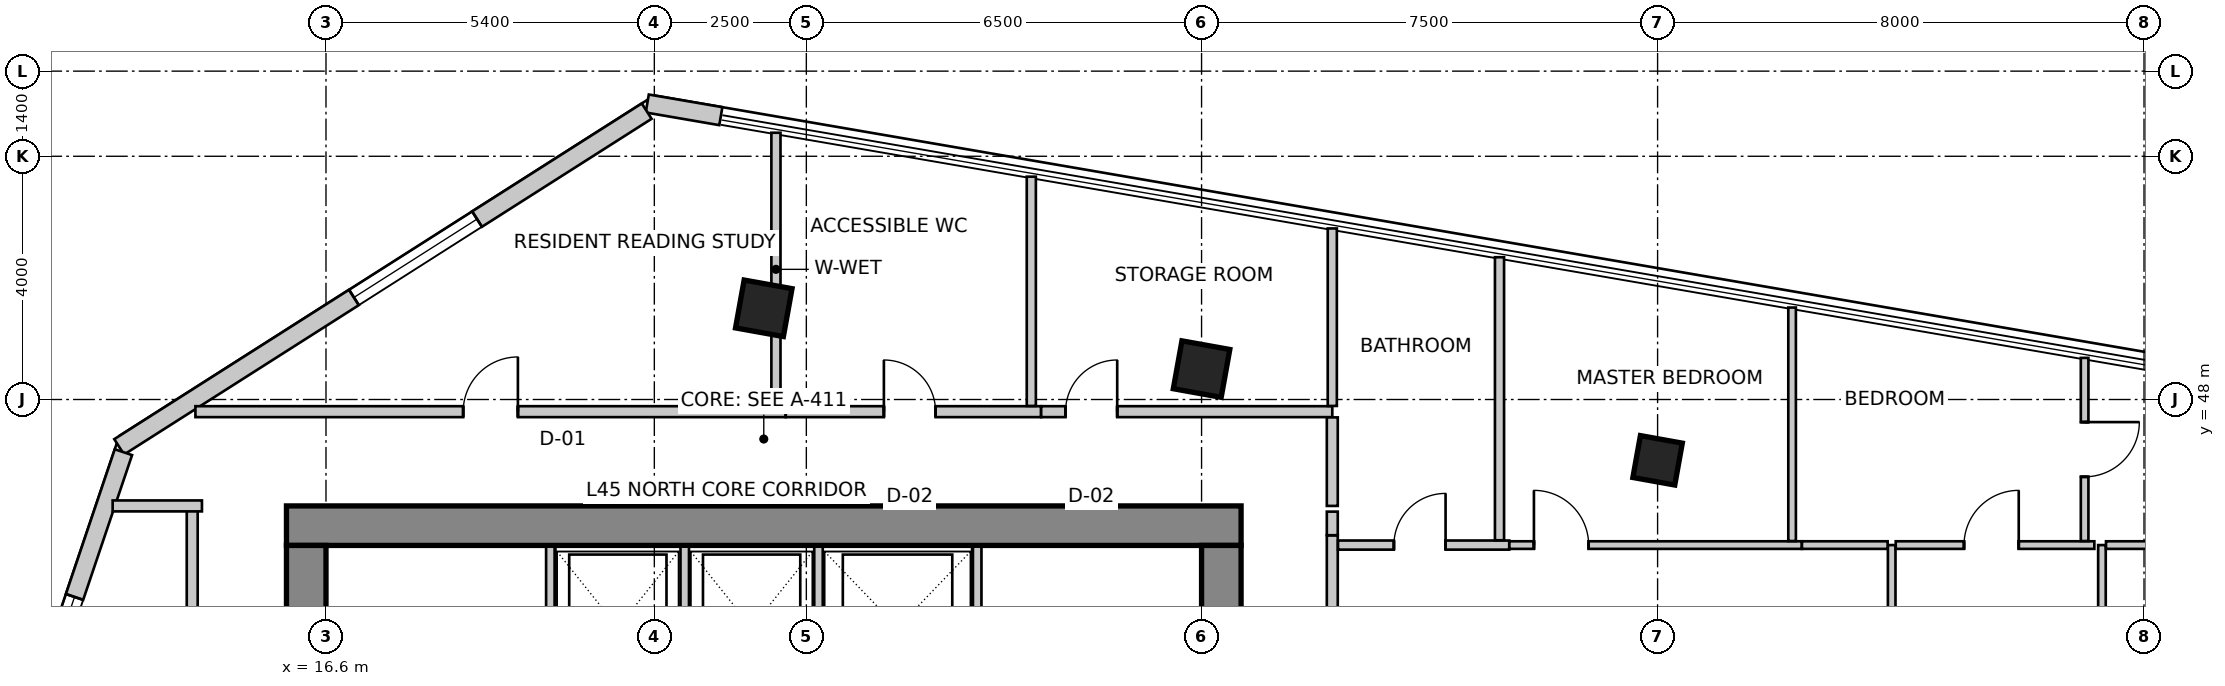
"""IFC4 building model, lengths in metres.
Left out: names, types, materials, properties, quantities, classifications, styles, units other than length and angle.
Written with IfcOpenShell. Run it as: python <this file> out.ifc"""

import sys

from ifc_helpers import new_model, si_unit, direction, frame, frame_2d, origin, origin_2d, place, context, subcontext, project, spatial, rectangle, extrude, source, transform, mapped, element, fill, save


model = new_model("IFC4")
c1 = context("Model", 3, precision=1e-05, world=origin(), true_north=direction((0.0, 1.0)))
c2 = subcontext(c1, "Body", "Model", "MODEL_VIEW")
j1 = project(units=[si_unit("LENGTHUNIT", "METRE"), si_unit("PLANEANGLEUNIT", "RADIAN")], contexts=[c1])
p1 = place(None, origin())
s1 = spatial("IfcSite", under=j1, at=p1, CompositionType="ELEMENT")
p2 = place(p1, origin())
s2 = spatial("IfcBuilding", under=s1, at=p2, CompositionType="ELEMENT")
p3 = place(p2, frame((0.0, 0.0, 183.4)))
s3 = spatial("IfcBuildingStorey", under=s2, at=p3, CompositionType="ELEMENT", Elevation=183.4)
p4 = place(p3, frame((15.95, 45.925, 0.0), z_axis=(0.0, 0.0, 1.0), x_axis=(1.0, 0.0, 0.0)))
e1 = element("IfcWall", 1, at=p4, inside=s3, PredefinedType="SHEAR", context=c2, shape_type="SweptSolid", body=[
    extrude(rectangle(XDim=15.7, YDim=0.65, at=frame_2d((7.85, 0.0))), origin(), (0.0, 0.0, 1.0), 3.5),
])
p5 = place(p3, frame((16.275, 34.2, 0.0), z_axis=(0.0, 0.0, 1.0), x_axis=(0.0, 1.0, 0.0)))
e2 = element("IfcWall", 2, at=p5, inside=s3, PredefinedType="SHEAR", context=c2, shape_type="SweptSolid", body=[
    extrude(rectangle(XDim=11.4, YDim=0.65, at=frame_2d((5.7, 0.0))), origin(), (0.0, 0.0, 1.0), 3.5),
])
m1 = source(origin(), c2, "Body", "SweptSolid", [
    extrude(rectangle(XDim=1.1, YDim=2.15, at=frame_2d((0.55, 1.075))), frame((0.0, 0.335, 0.0), z_axis=(0.0, -1.0, 0.0), x_axis=(1.0, 0.0, 0.0)), (0.0, 0.0, 1.0), 0.67),
])
p6 = place(p5, frame((7.15, 0.0, 0.0)))
e3 = element("IfcOpeningElement", 3, at=p6, cuts=e2, PredefinedType="OPENING", context=c2, shape_type="MappedRepresentation", body=[
    mapped(m1, transform((0.0, 0.0, 0.0), scale=1.0)),
])
p7 = place(p3, frame((31.325, 34.2, 0.0), z_axis=(0.0, 0.0, 1.0), x_axis=(0.0, 1.0, 0.0)))
e4 = element("IfcWall", 4, at=p7, inside=s3, PredefinedType="SHEAR", context=c2, shape_type="SweptSolid", body=[
    extrude(rectangle(XDim=11.4, YDim=0.65, at=frame_2d((5.7, 0.0))), origin(), (0.0, 0.0, 1.0), 3.5),
])
p8 = place(p7, frame((7.35, 0.0, 0.0)))
e5 = element("IfcOpeningElement", 5, at=p8, cuts=e4, PredefinedType="OPENING", context=c2, shape_type="MappedRepresentation", body=[
    mapped(m1, transform((0.0, 0.0, 0.0), scale=1.0)),
])
m2 = source(origin(), c2, "Body", "SweptSolid", [
    extrude(rectangle(XDim=0.8, YDim=0.8, at=origin_2d()), origin(), (0.0, 0.0, 1.0), 3.5),
])
for number, where, z_axis, x_axis in (
    (6, (23.8, 49.5, 0.0), (0.0, 0.0, 1.0), (0.984, -0.177, 0.0)),
    (7, (31.0, 48.5, 0.0), (0.0, 0.0, 1.0), (0.984, -0.177, 0.0)),
):
    element("IfcColumn", number, at=place(p3, frame(where, z_axis=z_axis, x_axis=x_axis)), inside=s3, PredefinedType="COLUMN", context=c2, shape_type="MappedRepresentation", body=[
        mapped(m2, transform((0.0, 0.0, 0.0), scale=1.0)),
    ])
m3 = source(origin(), c2, "Body", "SweptSolid", [
    extrude(rectangle(XDim=0.7, YDim=0.7, at=origin_2d()), origin(), (0.0, 0.0, 1.0), 3.5),
])
p9 = place(p3, frame((38.5, 47.0, 0.0), z_axis=(0.0, 0.0, 1.0), x_axis=(0.984195607969, -0.17708474032, 0.0)))
e8 = element("IfcColumn", 8, at=p9, inside=s3, PredefinedType="COLUMN", context=c2, shape_type="MappedRepresentation", body=[
    mapped(m3, transform((0.0, 0.0, 0.0), scale=1.0)),
])
p10 = place(p3, frame((23.094, 52.66, 0.0), z_axis=(0.0, 0.0, 1.0), x_axis=(-0.985503719785, 0.169653818966, 0.0)))
e9 = element("IfcWall", 9, at=p10, inside=s3, PredefinedType="SOLIDWALL", context=c2, shape_type="SweptSolid", body=[
    extrude(rectangle(XDim=1.228, YDim=0.3, at=frame_2d((0.614, 0.0))), origin(), (0.0, 0.0, 1.0), 3.25),
])
p11 = place(p3, frame((21.875, 52.742, 0.0), z_axis=(0.0, 0.0, 1.0), x_axis=(-0.843666375448, -0.536867811419, 0.0)))
e10 = element("IfcWall", 10, at=p11, inside=s3, PredefinedType="SOLIDWALL", context=c2, shape_type="SweptSolid", body=[
    extrude(rectangle(XDim=10.284, YDim=0.3, at=frame_2d((5.142, 0.0))), origin(), (0.0, 0.0, 1.0), 3.25),
])
m4 = source(origin(), c2, "Body", "SweptSolid", [
    extrude(rectangle(XDim=2.4, YDim=2.2, at=frame_2d((1.2, 1.1))), frame((0.0, 0.16, 0.0), z_axis=(0.0, -1.0, 0.0), x_axis=(1.0, 0.0, 0.0)), (0.0, 0.0, 1.0), 0.32),
])
p12 = place(p11, frame((3.307, 0.0, 0.85)))
e11 = element("IfcOpeningElement", 11, at=p12, cuts=e10, PredefinedType="OPENING", context=c2, shape_type="MappedRepresentation", body=[
    mapped(m4, transform((0.0, 0.0, 0.0), scale=1.0)),
])
p13 = place(p3, frame((13.269, 47.134, 0.0), z_axis=(0.0, 0.0, 1.0), x_axis=(-0.319920776449, -0.947444297464, 0.0)))
e12 = element("IfcWall", 12, at=p13, inside=s3, PredefinedType="SOLIDWALL", context=c2, shape_type="SweptSolid", body=[
    extrude(rectangle(XDim=16.133, YDim=0.3, at=frame_2d((8.067, 0.0))), origin(), (0.0, 0.0, 1.0), 3.25),
])
m5 = source(origin(), c2, "Body", "SweptSolid", [
    extrude(rectangle(XDim=2.1, YDim=2.0, at=frame_2d((1.05, 1.0))), frame((0.0, 0.16, 0.0), z_axis=(0.0, -1.0, 0.0), x_axis=(1.0, 0.0, 0.0)), (0.0, 0.0, 1.0), 0.32),
])
p14 = place(p13, frame((2.513, 0.0, 0.85)))
e13 = element("IfcOpeningElement", 13, at=p14, cuts=e12, PredefinedType="OPENING", context=c2, shape_type="MappedRepresentation", body=[
    mapped(m5, transform((0.0, 0.0, 0.0), scale=1.0)),
])
p15 = place(p13, frame((7.26, 0.0, 0.85)))
e14 = element("IfcOpeningElement", 14, at=p15, cuts=e12, PredefinedType="OPENING", context=c2, shape_type="MappedRepresentation", body=[
    mapped(m4, transform((0.0, 0.0, 0.0), scale=1.0)),
])
p16 = place(p13, frame((12.307, 0.0, 0.85)))
e15 = element("IfcOpeningElement", 15, at=p16, cuts=e12, PredefinedType="OPENING", context=c2, shape_type="MappedRepresentation", body=[
    mapped(m5, transform((0.0, 0.0, 0.0), scale=1.0)),
])
for number, where, z_axis, x_axis in (
    (16, (20.29, 43.28, 0.0), (0.0, 0.0, 1.0), (0.0, 1.0, 0.0)),
    (17, (27.31, 43.28, 0.0), (0.0, 0.0, 1.0), (0.0, 1.0, 0.0)),
):
    element("IfcWall", number, at=place(p3, frame(where, z_axis=z_axis, x_axis=x_axis)), inside=s3, PredefinedType="SOLIDWALL", context=c2, shape_type="SweptSolid", body=[
        extrude(rectangle(XDim=2.3, YDim=0.14, at=frame_2d((1.15, 0.0))), origin(), (0.0, 0.0, 1.0), 3.25),
    ])
for number, where, z_axis, x_axis in (
    (18, (22.5, 43.02, 0.0), (0.0, 0.0, 1.0), (0.0, 1.0, 0.0)),
    (19, (24.7, 43.02, 0.0), (0.0, 0.0, 1.0), (0.0, 1.0, 0.0)),
):
    element("IfcWall", number, at=place(p3, frame(where, z_axis=z_axis, x_axis=x_axis)), inside=s3, PredefinedType="SOLIDWALL", context=c2, shape_type="SweptSolid", body=[
        extrude(rectangle(XDim=2.56, YDim=0.14, at=frame_2d((1.28, 0.0))), origin(), (0.0, 0.0, 1.0), 3.25),
    ])
p17 = place(p3, frame((14.4, 33.644, 0.0), z_axis=(0.0, 0.0, 1.0), x_axis=(0.0, 1.0, 0.0)))
e20 = element("IfcWall", 20, at=p17, inside=s3, PredefinedType="PARTITIONING", context=c2, shape_type="SweptSolid", body=[
    extrude(rectangle(XDim=12.606, YDim=0.18, at=frame_2d((6.303, 0.0))), origin(), (0.0, 0.0, 1.0), 3.25),
])
m6 = source(origin(), c2, "Body", "SweptSolid", [
    extrude(rectangle(XDim=0.9, YDim=2.15, at=frame_2d((0.45, 1.075))), frame((0.0, 0.1, 0.0), z_axis=(0.0, -1.0, 0.0), x_axis=(1.0, 0.0, 0.0)), (0.0, 0.0, 1.0), 0.2),
])
p18 = place(p17, frame((4.399, 0.0, 0.0)))
e21 = element("IfcOpeningElement", 21, at=p18, cuts=e20, PredefinedType="OPENING", context=c2, shape_type="MappedRepresentation", body=[
    mapped(m6, transform((0.0, 0.0, 0.0), scale=1.0)),
])
p19 = place(p3, frame((14.56, 46.25, 0.0), z_axis=(0.0, 0.0, 1.0), x_axis=(-1.0, 0.0, 0.0)))
e22 = element("IfcWall", 22, at=p19, inside=s3, PredefinedType="PARTITIONING", context=c2, shape_type="SweptSolid", body=[
    extrude(rectangle(XDim=1.469, YDim=0.18, at=frame_2d((0.734, 0.0))), origin(), (0.0, 0.0, 1.0), 3.25),
])
p20 = place(p3, frame((14.453, 47.8, 0.0), z_axis=(0.0, 0.0, 1.0), x_axis=(1.0, 0.0, 0.0)))
e23 = element("IfcWall", 23, at=p20, inside=s3, PredefinedType="PARTITIONING", context=c2, shape_type="SweptSolid", body=[
    extrude(rectangle(XDim=9.707, YDim=0.18, at=frame_2d((4.854, 0.0))), origin(), (0.0, 0.0, 1.0), 2.835),
])
p21 = place(p20, frame((4.404, 0.0, 0.0)))
e24 = element("IfcOpeningElement", 24, at=p21, cuts=e23, PredefinedType="OPENING", context=c2, shape_type="MappedRepresentation", body=[
    mapped(m6, transform((0.0, 0.0, 0.0), scale=1.0)),
])
p22 = place(p3, frame((24.162, 47.8, 0.0), z_axis=(0.0, 0.0, 1.0), x_axis=(1.0, 0.0, 0.0)))
e25 = element("IfcWall", 25, at=p22, inside=s3, PredefinedType="PARTITIONING", context=c2, shape_type="SweptSolid", body=[
    extrude(rectangle(XDim=4.198, YDim=0.18, at=frame_2d((2.099, 0.0))), origin(), (0.0, 0.0, 1.0), 3.25),
])
m7 = source(origin(), c2, "Body", "SweptSolid", [
    extrude(rectangle(XDim=0.85, YDim=2.15, at=frame_2d((0.425, 1.075))), frame((0.0, 0.1, 0.0), z_axis=(0.0, -1.0, 0.0), x_axis=(1.0, 0.0, 0.0)), (0.0, 0.0, 1.0), 0.2),
])
p23 = place(p22, frame((1.613, 0.0, 0.0)))
e26 = element("IfcOpeningElement", 26, at=p23, cuts=e25, PredefinedType="OPENING", context=c2, shape_type="MappedRepresentation", body=[
    mapped(m7, transform((0.0, 0.0, 0.0), scale=1.0)),
])
p24 = place(p3, frame((28.362, 47.8, 0.0), z_axis=(0.0, 0.0, 1.0), x_axis=(1.0, 0.0, 0.0)))
e27 = element("IfcWall", 27, at=p24, inside=s3, PredefinedType="PARTITIONING", context=c2, shape_type="SweptSolid", body=[
    extrude(rectangle(XDim=4.788, YDim=0.18, at=frame_2d((2.394, 0.0))), origin(), (0.0, 0.0, 1.0), 2.688),
])
p25 = place(p24, frame((0.401, 0.0, 0.0)))
e28 = element("IfcOpeningElement", 28, at=p25, cuts=e27, PredefinedType="OPENING", context=c2, shape_type="MappedRepresentation", body=[
    mapped(m7, transform((0.0, 0.0, 0.0), scale=1.0)),
])
p26 = place(p3, frame((33.15, 47.706, 0.0), z_axis=(0.0, 0.0, 1.0), x_axis=(0.0, -1.0, 0.0)))
e29 = element("IfcWall", 29, at=p26, inside=s3, PredefinedType="PARTITIONING", context=c2, shape_type="SweptSolid", body=[
    extrude(rectangle(XDim=1.456, YDim=0.18, at=frame_2d((0.728, 0.0))), origin(), (0.0, 0.0, 1.0), 2.688),
])
p27 = place(p3, frame((33.15, 45.766, 0.0), z_axis=(0.0, 0.0, 1.0), x_axis=(0.0, -1.0, 0.0)))
e30 = element("IfcWall", 30, at=p27, inside=s3, PredefinedType="PARTITIONING", context=c2, shape_type="SweptSolid", body=[
    extrude(rectangle(XDim=5.526, YDim=0.18, at=frame_2d((2.763, 0.0))), origin(), (0.0, 0.0, 1.0), 2.688),
])
p28 = place(p3, frame((33.15, 46.156, 0.0), z_axis=(0.0, 0.0, 1.0), x_axis=(0.0, -1.0, 0.0)))
e31 = element("IfcWall", 31, at=p28, inside=s3, PredefinedType="PARTITIONING", context=c2, shape_type="SweptSolid", body=[
    extrude(rectangle(XDim=0.388, YDim=0.18, at=frame_2d((0.194, 0.0))), origin(), (0.0, 0.0, 1.0), 3.25),
])
p29 = place(p3, frame((24.0, 52.387, 0.0), z_axis=(0.0, 0.0, 1.0), x_axis=(0.0, -1.0, 0.0)))
e32 = element("IfcWall", 32, at=p29, inside=s3, PredefinedType="PARTITIONING", context=c2, shape_type="SweptSolid", body=[
    extrude(rectangle(XDim=4.493, YDim=0.15, at=frame_2d((2.247, 0.0))), origin(), (0.0, 0.0, 1.0), 2.542),
])
p30 = place(p3, frame((28.2, 51.665, 0.0), z_axis=(0.0, 0.0, 1.0), x_axis=(0.0, -1.0, 0.0)))
e33 = element("IfcWall", 33, at=p30, inside=s3, PredefinedType="PARTITIONING", context=c2, shape_type="SweptSolid", body=[
    extrude(rectangle(XDim=3.771, YDim=0.15, at=frame_2d((1.885, 0.0))), origin(), (0.0, 0.0, 1.0), 2.542),
])
p31 = place(p3, frame((33.15, 50.813, 0.0), z_axis=(0.0, 0.0, 1.0), x_axis=(0.0, -1.0, 0.0)))
e34 = element("IfcWall", 34, at=p31, inside=s3, PredefinedType="PARTITIONING", context=c2, shape_type="SweptSolid", body=[
    extrude(rectangle(XDim=2.919, YDim=0.15, at=frame_2d((1.459, 0.0))), origin(), (0.0, 0.0, 1.0), 2.542),
])
p32 = place(p3, frame((45.808, 40.494, 0.0), z_axis=(0.0, 0.0, 1.0), x_axis=(0.0, 1.0, 0.0)))
e35 = element("IfcWall", 35, at=p32, inside=s3, PredefinedType="PARTITIONING", context=c2, shape_type="SweptSolid", body=[
    extrude(rectangle(XDim=5.112, YDim=0.125, at=frame_2d((2.556, 0.0))), origin(), (0.0, 0.0, 1.0), 2.688),
])
m8 = source(origin(), c2, "Body", "SweptSolid", [
    extrude(rectangle(XDim=0.9, YDim=2.15, at=frame_2d((0.45, 1.075))), frame((0.0, 0.073, 0.0), z_axis=(0.0, -1.0, 0.0), x_axis=(1.0, 0.0, 0.0)), (0.0, 0.0, 1.0), 0.145),
])
p33 = place(p32, frame((2.106, 0.0, 0.0)))
e36 = element("IfcOpeningElement", 36, at=p33, cuts=e35, PredefinedType="OPENING", context=c2, shape_type="MappedRepresentation", body=[
    mapped(m8, transform((0.0, 0.0, 0.0), scale=1.0)),
])
p34 = place(p3, frame((45.875, 45.606, 0.0), z_axis=(0.0, 0.0, 1.0), x_axis=(1.0, 0.0, 0.0)))
e37 = element("IfcWall", 37, at=p34, inside=s3, PredefinedType="PARTITIONING", context=c2, shape_type="SweptSolid", body=[
    extrude(rectangle(XDim=4.46, YDim=0.125, at=frame_2d((2.23, 0.0))), origin(), (0.0, 0.0, 1.0), 2.542),
])
p35 = place(p3, frame((42.35, 45.606, 0.0), z_axis=(0.0, 0.0, 1.0), x_axis=(0.0, -1.0, 0.0)))
e38 = element("IfcWall", 38, at=p35, inside=s3, PredefinedType="PARTITIONING", context=c2, shape_type="SweptSolid", body=[
    extrude(rectangle(XDim=5.112, YDim=0.125, at=frame_2d((2.556, 0.0))), origin(), (0.0, 0.0, 1.0), 2.835),
])
m9 = source(origin(), c2, "Body", "SweptSolid", [
    extrude(rectangle(XDim=0.85, YDim=2.15, at=frame_2d((0.425, 1.075))), frame((0.0, 0.073, 0.0), z_axis=(0.0, -1.0, 0.0), x_axis=(1.0, 0.0, 0.0)), (0.0, 0.0, 1.0), 0.145),
])
p36 = place(p35, frame((2.131, 0.0, 0.0)))
e39 = element("IfcOpeningElement", 39, at=p36, cuts=e38, PredefinedType="OPENING", context=c2, shape_type="MappedRepresentation", body=[
    mapped(m9, transform((0.0, 0.0, 0.0), scale=1.0)),
])
p37 = place(p3, frame((33.244, 45.606, 0.0), z_axis=(0.0, 0.0, 1.0), x_axis=(1.0, 0.0, 0.0)))
e40 = element("IfcWall", 40, at=p37, inside=s3, PredefinedType="PARTITIONING", context=c2, shape_type="SweptSolid", body=[
    extrude(rectangle(XDim=2.816, YDim=0.15, at=frame_2d((1.408, 0.0))), origin(), (0.0, 0.0, 1.0), 2.688),
])
m10 = source(origin(), c2, "Body", "SweptSolid", [
    extrude(rectangle(XDim=0.85, YDim=2.15, at=frame_2d((0.425, 1.075))), frame((0.0, 0.085, 0.0), z_axis=(0.0, -1.0, 0.0), x_axis=(1.0, 0.0, 0.0)), (0.0, 0.0, 1.0), 0.17),
])
p38 = place(p37, frame((0.919, 0.0, 0.0)))
e41 = element("IfcOpeningElement", 41, at=p38, cuts=e40, PredefinedType="OPENING", context=c2, shape_type="MappedRepresentation", body=[
    mapped(m10, transform((0.0, 0.0, 0.0), scale=1.0)),
])
p39 = place(p3, frame((36.062, 45.606, 0.0), z_axis=(0.0, 0.0, 1.0), x_axis=(1.0, 0.0, 0.0)))
e42 = element("IfcWall", 42, at=p39, inside=s3, PredefinedType="PARTITIONING", context=c2, shape_type="SweptSolid", body=[
    extrude(rectangle(XDim=4.81, YDim=0.125, at=frame_2d((2.405, 0.0))), origin(), (0.0, 0.0, 1.0), 2.766),
])
p40 = place(p39, frame((0.404, 0.0, 0.0)))
e43 = element("IfcOpeningElement", 43, at=p40, cuts=e42, PredefinedType="OPENING", context=c2, shape_type="MappedRepresentation", body=[
    mapped(m8, transform((0.0, 0.0, 0.0), scale=1.0)),
])
p41 = place(p3, frame((40.874, 45.606, 0.0), z_axis=(0.0, 0.0, 1.0), x_axis=(1.0, 0.0, 0.0)))
e44 = element("IfcWall", 44, at=p41, inside=s3, PredefinedType="PARTITIONING", context=c2, shape_type="SweptSolid", body=[
    extrude(rectangle(XDim=1.409, YDim=0.125, at=frame_2d((0.705, 0.0))), origin(), (0.0, 0.0, 1.0), 3.25),
])
p42 = place(p3, frame((42.417, 45.606, 0.0), z_axis=(0.0, 0.0, 1.0), x_axis=(1.0, 0.0, 0.0)))
e45 = element("IfcWall", 45, at=p42, inside=s3, PredefinedType="PARTITIONING", context=c2, shape_type="SweptSolid", body=[
    extrude(rectangle(XDim=3.267, YDim=0.125, at=frame_2d((1.633, 0.0))), origin(), (0.0, 0.0, 1.0), 3.25),
])
p43 = place(p42, frame((1.123, 0.0, 0.0)))
e46 = element("IfcOpeningElement", 46, at=p43, cuts=e45, PredefinedType="OPENING", context=c2, shape_type="MappedRepresentation", body=[
    mapped(m8, transform((0.0, 0.0, 0.0), scale=1.0)),
])
p44 = place(p3, frame((35.9, 50.34, 0.0), z_axis=(0.0, 0.0, 1.0), x_axis=(0.0, -1.0, 0.0)))
e47 = element("IfcWall", 47, at=p44, inside=s3, PredefinedType="PARTITIONING", context=c2, shape_type="SweptSolid", body=[
    extrude(rectangle(XDim=4.655, YDim=0.15, at=frame_2d((2.327, 0.0))), origin(), (0.0, 0.0, 1.0), 2.542),
])
p45 = place(p3, frame((40.712, 49.512, 0.0), z_axis=(0.0, 0.0, 1.0), x_axis=(0.0, -1.0, 0.0)))
e48 = element("IfcWall", 48, at=p45, inside=s3, PredefinedType="PARTITIONING", context=c2, shape_type="SweptSolid", body=[
    extrude(rectangle(XDim=3.84, YDim=0.125, at=frame_2d((1.92, 0.0))), origin(), (0.0, 0.0, 1.0), 2.542),
])
p46 = place(p3, frame((45.523, 48.684, 0.0), z_axis=(0.0, 0.0, 1.0), x_axis=(0.0, -1.0, 0.0)))
e49 = element("IfcWall", 49, at=p46, inside=s3, PredefinedType="PARTITIONING", context=c2, shape_type="SweptSolid", body=[
    extrude(rectangle(XDim=3.012, YDim=0.125, at=frame_2d((1.506, 0.0))), origin(), (0.0, 0.0, 1.0), 2.542),
])
p47 = place(p46, frame((1.056, 0.0, 0.0)))
e50 = element("IfcOpeningElement", 50, at=p47, cuts=e49, PredefinedType="OPENING", context=c2, shape_type="MappedRepresentation", body=[
    mapped(m8, transform((0.0, 0.0, 0.0), scale=1.0)),
])
m11 = source(origin(), c2, "Body", "SweptSolid", [
    extrude(rectangle(XDim=2.4, YDim=2.2, at=frame_2d((1.2, 1.1))), frame((0.0, -0.015, 0.0), z_axis=(0.0, -1.0, 0.0), x_axis=(1.0, 0.0, 0.0)), (0.0, 0.0, 1.0), 0.06),
])
p48 = place(p12, origin())
e51 = element("IfcWindow", 51, at=p48, inside=s3, PartitioningType="SINGLE_PANEL", PredefinedType="WINDOW", context=c2, shape_type="MappedRepresentation", body=[
    mapped(m11, transform((0.0, 0.0, 0.0), scale=1.0)),
])
fill(e11, e51)
m12 = source(origin(), c2, "Body", "SweptSolid", [
    extrude(rectangle(XDim=2.1, YDim=2.0, at=frame_2d((1.05, 1.0))), frame((0.0, -0.015, 0.0), z_axis=(0.0, -1.0, 0.0), x_axis=(1.0, 0.0, 0.0)), (0.0, 0.0, 1.0), 0.06),
])
p49 = place(p14, origin())
e52 = element("IfcWindow", 52, at=p49, inside=s3, PartitioningType="SINGLE_PANEL", PredefinedType="WINDOW", context=c2, shape_type="MappedRepresentation", body=[
    mapped(m12, transform((0.0, 0.0, 0.0), scale=1.0)),
])
fill(e13, e52)
m13 = source(origin(), c2, "Body", "SweptSolid", [
    extrude(rectangle(XDim=0.9, YDim=2.15, at=frame_2d((0.45, 1.075))), frame((0.0, 0.025, 0.0), z_axis=(0.0, -1.0, 0.0), x_axis=(1.0, 0.0, 0.0)), (0.0, 0.0, 1.0), 0.05),
])
p50 = place(p21, origin())
e53 = element("IfcDoor", 53, at=p50, inside=s3, OperationType="SINGLE_SWING_RIGHT", PredefinedType="DOOR", context=c2, shape_type="MappedRepresentation", body=[
    mapped(m13, transform((0.0, 0.0, 0.0), scale=1.0)),
])
fill(e24, e53)
m14 = source(origin(), c2, "Body", "SweptSolid", [
    extrude(rectangle(XDim=0.85, YDim=2.15, at=frame_2d((0.425, 1.075))), frame((0.0, 0.025, 0.0), z_axis=(0.0, -1.0, 0.0), x_axis=(1.0, 0.0, 0.0)), (0.0, 0.0, 1.0), 0.05),
])
p51 = place(p23, origin())
e54 = element("IfcDoor", 54, at=p51, inside=s3, OperationType="SINGLE_SWING_LEFT", PredefinedType="DOOR", context=c2, shape_type="MappedRepresentation", body=[
    mapped(m14, transform((0.0, 0.0, 0.0), scale=1.0)),
])
fill(e26, e54)
p52 = place(p25, origin())
e55 = element("IfcDoor", 55, at=p52, inside=s3, OperationType="SINGLE_SWING_RIGHT", PredefinedType="DOOR", context=c2, shape_type="MappedRepresentation", body=[
    mapped(m14, transform((0.0, 0.0, 0.0), scale=1.0)),
])
fill(e28, e55)
p53 = place(p38, origin())
e56 = element("IfcDoor", 56, at=p53, inside=s3, OperationType="SINGLE_SWING_RIGHT", PredefinedType="DOOR", context=c2, shape_type="MappedRepresentation", body=[
    mapped(m14, transform((0.0, 0.0, 0.0), scale=1.0)),
])
fill(e41, e56)
p54 = place(p40, origin())
e57 = element("IfcDoor", 57, at=p54, inside=s3, OperationType="SINGLE_SWING_LEFT", PredefinedType="DOOR", context=c2, shape_type="MappedRepresentation", body=[
    mapped(m13, transform((0.0, 0.0, 0.0), scale=1.0)),
])
fill(e43, e57)
p55 = place(p43, origin())
e58 = element("IfcDoor", 58, at=p55, inside=s3, OperationType="SINGLE_SWING_RIGHT", PredefinedType="DOOR", context=c2, shape_type="MappedRepresentation", body=[
    mapped(m13, transform((0.0, 0.0, 0.0), scale=1.0)),
])
fill(e46, e58)
p56 = place(p47, origin())
e59 = element("IfcDoor", 59, at=p56, inside=s3, OperationType="SINGLE_SWING_LEFT", PredefinedType="DOOR", context=c2, shape_type="MappedRepresentation", body=[
    mapped(m13, transform((0.0, 0.0, 0.0), scale=1.0)),
])
fill(e50, e59)
save(model, sys.argv[1])
